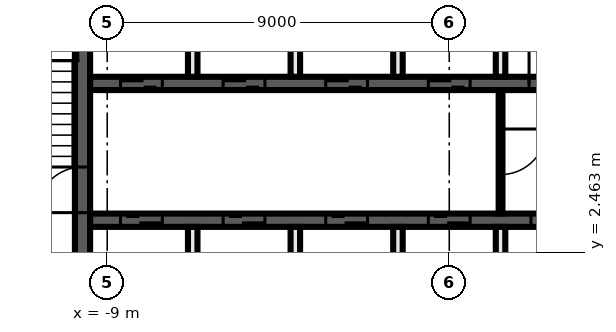
"""IFC4 building model, lengths in metres.
Left out: names, types, materials, properties, quantities, classifications, styles, units other than length and angle.
Written with IfcOpenShell. Run it as: python <this file> out.ifc"""

import sys

from ifc_helpers import new_model, si_unit, direction, frame, frame_2d, origin, place, context, subcontext, project, spatial, rectangle, extrude, element, fill, save


model = new_model("IFC4")
c1 = context("Model", 3, precision=1e-05, world=origin(), true_north=direction((0.0, 1.0)))
c2 = subcontext(c1, "Body", "Model", "MODEL_VIEW")
j1 = project(units=[si_unit("LENGTHUNIT", "METRE"), si_unit("PLANEANGLEUNIT", "RADIAN")], contexts=[c1])
p1 = place(None, origin())
s1 = spatial("IfcSite", under=j1, at=p1, CompositionType="ELEMENT")
p2 = place(p1, origin())
s2 = spatial("IfcBuilding", under=s1, at=p2, CompositionType="ELEMENT")
p3 = place(p2, frame((0.0, 0.0, 62.5)))
s3 = spatial("IfcBuildingStorey", under=s2, at=p3, CompositionType="ELEMENT", Elevation=62.5)
p4 = place(p3, frame((-9.65, 2.3, 0.0), z_axis=(0.0, 0.0, 1.0), x_axis=(0.0, 1.0, 0.0)))
e1 = element("IfcWall", 1, at=p4, inside=s3, PredefinedType="SHEAR", context=c2, shape_type="SweptSolid", body=[
    extrude(rectangle(XDim=7.5, YDim=0.4, at=frame_2d((3.75, 0.0))), origin(), (0.0, 0.0, 1.0), 3.3),
])
p5 = place(p4, frame((1.2, 0.0, 0.0)))
e2 = element("IfcOpeningElement", 2, at=p5, cuts=e1, PredefinedType="OPENING", context=c2, shape_type="SweptSolid", body=[
    extrude(rectangle(XDim=1.2, YDim=2.1, at=frame_2d((0.6, 1.05))), frame((0.0, 0.21, 0.0), z_axis=(0.0, -1.0, 0.0), x_axis=(1.0, 0.0, 0.0)), (0.0, 0.0, 1.0), 0.42),
])
p6 = place(p3, frame((-9.45, 6.9, 0.0), z_axis=(0.0, 0.0, 1.0), x_axis=(1.0, 0.0, 0.0)))
e3 = element("IfcWall", 3, at=p6, inside=s3, PredefinedType="SHEAR", context=c2, shape_type="SweptSolid", body=[
    extrude(rectangle(XDim=18.9, YDim=0.35, at=frame_2d((9.45, 0.0))), origin(), (0.0, 0.0, 1.0), 3.3),
])
p7 = place(p6, frame((0.8, 0.0, 0.0)))
e4 = element("IfcOpeningElement", 4, at=p7, cuts=e3, PredefinedType="OPENING", context=c2, shape_type="SweptSolid", body=[
    extrude(rectangle(XDim=1.1, YDim=2.1, at=frame_2d((0.55, 1.05))), frame((0.0, 0.185, 0.0), z_axis=(0.0, -1.0, 0.0), x_axis=(1.0, 0.0, 0.0)), (0.0, 0.0, 1.0), 0.37),
])
p8 = place(p6, frame((3.5, 0.0, 0.0)))
e5 = element("IfcOpeningElement", 5, at=p8, cuts=e3, PredefinedType="OPENING", context=c2, shape_type="SweptSolid", body=[
    extrude(rectangle(XDim=1.1, YDim=2.1, at=frame_2d((0.55, 1.05))), frame((0.0, 0.185, 0.0), z_axis=(0.0, -1.0, 0.0), x_axis=(1.0, 0.0, 0.0)), (0.0, 0.0, 1.0), 0.37),
])
p9 = place(p6, frame((6.2, 0.0, 0.0)))
e6 = element("IfcOpeningElement", 6, at=p9, cuts=e3, PredefinedType="OPENING", context=c2, shape_type="SweptSolid", body=[
    extrude(rectangle(XDim=1.1, YDim=2.1, at=frame_2d((0.55, 1.05))), frame((0.0, 0.185, 0.0), z_axis=(0.0, -1.0, 0.0), x_axis=(1.0, 0.0, 0.0)), (0.0, 0.0, 1.0), 0.37),
])
p10 = place(p6, frame((8.9, 0.0, 0.0)))
e7 = element("IfcOpeningElement", 7, at=p10, cuts=e3, PredefinedType="OPENING", context=c2, shape_type="SweptSolid", body=[
    extrude(rectangle(XDim=1.1, YDim=2.1, at=frame_2d((0.55, 1.05))), frame((0.0, 0.185, 0.0), z_axis=(0.0, -1.0, 0.0), x_axis=(1.0, 0.0, 0.0)), (0.0, 0.0, 1.0), 0.37),
])
p11 = place(p6, frame((11.55, 0.0, 0.0)))
e8 = element("IfcOpeningElement", 8, at=p11, cuts=e3, PredefinedType="OPENING", context=c2, shape_type="SweptSolid", body=[
    extrude(rectangle(XDim=1.2, YDim=2.1, at=frame_2d((0.6, 1.05))), frame((0.0, 0.185, 0.0), z_axis=(0.0, -1.0, 0.0), x_axis=(1.0, 0.0, 0.0)), (0.0, 0.0, 1.0), 0.37),
])
p12 = place(p6, frame((14.3, 0.0, 0.0)))
e9 = element("IfcOpeningElement", 9, at=p12, cuts=e3, PredefinedType="OPENING", context=c2, shape_type="SweptSolid", body=[
    extrude(rectangle(XDim=1.1, YDim=2.1, at=frame_2d((0.55, 1.05))), frame((0.0, 0.185, 0.0), z_axis=(0.0, -1.0, 0.0), x_axis=(1.0, 0.0, 0.0)), (0.0, 0.0, 1.0), 0.37),
])
p13 = place(p6, frame((17.0, 0.0, 0.0)))
e10 = element("IfcOpeningElement", 10, at=p13, cuts=e3, PredefinedType="OPENING", context=c2, shape_type="SweptSolid", body=[
    extrude(rectangle(XDim=1.1, YDim=2.1, at=frame_2d((0.55, 1.05))), frame((0.0, 0.185, 0.0), z_axis=(0.0, -1.0, 0.0), x_axis=(1.0, 0.0, 0.0)), (0.0, 0.0, 1.0), 0.37),
])
p14 = place(p3, frame((9.45, 3.3, 0.0), z_axis=(0.0, 0.0, 1.0), x_axis=(-1.0, 0.0, 0.0)))
e11 = element("IfcWall", 11, at=p14, inside=s3, PredefinedType="SHEAR", context=c2, shape_type="SweptSolid", body=[
    extrude(rectangle(XDim=18.9, YDim=0.35, at=frame_2d((9.45, 0.0))), origin(), (0.0, 0.0, 1.0), 3.3),
])
p15 = place(p14, frame((17.0, 0.0, 0.0)))
e12 = element("IfcOpeningElement", 12, at=p15, cuts=e11, PredefinedType="OPENING", context=c2, shape_type="SweptSolid", body=[
    extrude(rectangle(XDim=1.1, YDim=2.1, at=frame_2d((0.55, 1.05))), frame((0.0, 0.185, 0.0), z_axis=(0.0, -1.0, 0.0), x_axis=(1.0, 0.0, 0.0)), (0.0, 0.0, 1.0), 0.37),
])
p16 = place(p14, frame((14.3, 0.0, 0.0)))
e13 = element("IfcOpeningElement", 13, at=p16, cuts=e11, PredefinedType="OPENING", context=c2, shape_type="SweptSolid", body=[
    extrude(rectangle(XDim=1.1, YDim=2.1, at=frame_2d((0.55, 1.05))), frame((0.0, 0.185, 0.0), z_axis=(0.0, -1.0, 0.0), x_axis=(1.0, 0.0, 0.0)), (0.0, 0.0, 1.0), 0.37),
])
p17 = place(p14, frame((11.6, 0.0, 0.0)))
e14 = element("IfcOpeningElement", 14, at=p17, cuts=e11, PredefinedType="OPENING", context=c2, shape_type="SweptSolid", body=[
    extrude(rectangle(XDim=1.1, YDim=2.1, at=frame_2d((0.55, 1.05))), frame((0.0, 0.185, 0.0), z_axis=(0.0, -1.0, 0.0), x_axis=(1.0, 0.0, 0.0)), (0.0, 0.0, 1.0), 0.37),
])
p18 = place(p14, frame((8.9, 0.0, 0.0)))
e15 = element("IfcOpeningElement", 15, at=p18, cuts=e11, PredefinedType="OPENING", context=c2, shape_type="SweptSolid", body=[
    extrude(rectangle(XDim=1.1, YDim=2.1, at=frame_2d((0.55, 1.05))), frame((0.0, 0.185, 0.0), z_axis=(0.0, -1.0, 0.0), x_axis=(1.0, 0.0, 0.0)), (0.0, 0.0, 1.0), 0.37),
])
p19 = place(p14, frame((6.2, 0.0, 0.0)))
e16 = element("IfcOpeningElement", 16, at=p19, cuts=e11, PredefinedType="OPENING", context=c2, shape_type="SweptSolid", body=[
    extrude(rectangle(XDim=1.1, YDim=2.1, at=frame_2d((0.55, 1.05))), frame((0.0, 0.185, 0.0), z_axis=(0.0, -1.0, 0.0), x_axis=(1.0, 0.0, 0.0)), (0.0, 0.0, 1.0), 0.37),
])
p20 = place(p14, frame((3.5, 0.0, 0.0)))
e17 = element("IfcOpeningElement", 17, at=p20, cuts=e11, PredefinedType="OPENING", context=c2, shape_type="SweptSolid", body=[
    extrude(rectangle(XDim=1.1, YDim=2.1, at=frame_2d((0.55, 1.05))), frame((0.0, 0.185, 0.0), z_axis=(0.0, -1.0, 0.0), x_axis=(1.0, 0.0, 0.0)), (0.0, 0.0, 1.0), 0.37),
])
p21 = place(p14, frame((0.9, 0.0, 0.0)))
e18 = element("IfcOpeningElement", 18, at=p21, cuts=e11, PredefinedType="OPENING", context=c2, shape_type="SweptSolid", body=[
    extrude(rectangle(XDim=0.9, YDim=2.1, at=frame_2d((0.45, 1.05))), frame((0.0, 0.185, 0.0), z_axis=(0.0, -1.0, 0.0), x_axis=(1.0, 0.0, 0.0)), (0.0, 0.0, 1.0), 0.37),
])
p22 = place(p3, frame((1.35, 6.725, 0.0), z_axis=(0.0, 0.0, 1.0), x_axis=(0.0, -1.0, 0.0)))
e19 = element("IfcWall", 19, at=p22, inside=s3, PredefinedType="PARTITIONING", context=c2, shape_type="SweptSolid", body=[
    extrude(rectangle(XDim=3.25, YDim=0.1, at=frame_2d((1.625, 0.0))), origin(), (0.0, 0.0, 1.0), 3.3),
])
p23 = place(p22, frame((1.025, 0.0, 0.0)))
e20 = element("IfcOpeningElement", 20, at=p23, cuts=e19, PredefinedType="OPENING", context=c2, shape_type="SweptSolid", body=[
    extrude(rectangle(XDim=1.2, YDim=2.1, at=frame_2d((0.6, 1.05))), frame((0.0, 0.06, 0.0), z_axis=(0.0, -1.0, 0.0), x_axis=(1.0, 0.0, 0.0)), (0.0, 0.0, 1.0), 0.12),
])
for number, where, z_axis, x_axis in (
    (21, (1.35, 0.4, 0.0), (0.0, 0.0, 1.0), (0.0, 1.0, 0.0)),
    (22, (1.35, 7.075, 0.0), (0.0, 0.0, 1.0), (0.0, 1.0, 0.0)),
    (23, (-1.35, 0.4, 0.0), (0.0, 0.0, 1.0), (0.0, 1.0, 0.0)),
    (24, (-1.35, 7.075, 0.0), (0.0, 0.0, 1.0), (0.0, 1.0, 0.0)),
    (25, (-4.05, 0.4, 0.0), (0.0, 0.0, 1.0), (0.0, 1.0, 0.0)),
    (26, (-4.05, 7.075, 0.0), (0.0, 0.0, 1.0), (0.0, 1.0, 0.0)),
    (27, (-6.75, 0.4, 0.0), (0.0, 0.0, 1.0), (0.0, 1.0, 0.0)),
    (28, (-6.75, 7.075, 0.0), (0.0, 0.0, 1.0), (0.0, 1.0, 0.0)),
):
    element("IfcWall", number, at=place(p3, frame(where, z_axis=z_axis, x_axis=x_axis)), inside=s3, PredefinedType="SOLIDWALL", context=c2, shape_type="SweptSolid", body=[
        extrude(rectangle(XDim=2.725, YDim=0.25, at=frame_2d((1.363, 0.0))), origin(), (0.0, 0.0, 1.0), 3.3),
    ])
p24 = place(p7, origin())
e29 = element("IfcDoor", 29, at=p24, inside=s3, OperationType="DOUBLE_DOOR_SLIDING", PredefinedType="DOOR", context=c2, shape_type="SweptSolid", body=[
    extrude(rectangle(XDim=1.1, YDim=2.1, at=frame_2d((0.55, 1.05))), frame((0.0, 0.025, 0.0), z_axis=(0.0, -1.0, 0.0), x_axis=(1.0, 0.0, 0.0)), (0.0, 0.0, 1.0), 0.05),
])
fill(e4, e29)
p25 = place(p8, origin())
e30 = element("IfcDoor", 30, at=p25, inside=s3, OperationType="DOUBLE_DOOR_SLIDING", PredefinedType="DOOR", context=c2, shape_type="SweptSolid", body=[
    extrude(rectangle(XDim=1.1, YDim=2.1, at=frame_2d((0.55, 1.05))), frame((0.0, 0.025, 0.0), z_axis=(0.0, -1.0, 0.0), x_axis=(1.0, 0.0, 0.0)), (0.0, 0.0, 1.0), 0.05),
])
fill(e5, e30)
p26 = place(p9, origin())
e31 = element("IfcDoor", 31, at=p26, inside=s3, OperationType="DOUBLE_DOOR_SLIDING", PredefinedType="DOOR", context=c2, shape_type="SweptSolid", body=[
    extrude(rectangle(XDim=1.1, YDim=2.1, at=frame_2d((0.55, 1.05))), frame((0.0, 0.025, 0.0), z_axis=(0.0, -1.0, 0.0), x_axis=(1.0, 0.0, 0.0)), (0.0, 0.0, 1.0), 0.05),
])
fill(e6, e31)
p27 = place(p10, origin())
e32 = element("IfcDoor", 32, at=p27, inside=s3, OperationType="DOUBLE_DOOR_SLIDING", PredefinedType="DOOR", context=c2, shape_type="SweptSolid", body=[
    extrude(rectangle(XDim=1.1, YDim=2.1, at=frame_2d((0.55, 1.05))), frame((0.0, 0.025, 0.0), z_axis=(0.0, -1.0, 0.0), x_axis=(1.0, 0.0, 0.0)), (0.0, 0.0, 1.0), 0.05),
])
fill(e7, e32)
p28 = place(p11, origin())
e33 = element("IfcDoor", 33, at=p28, inside=s3, OperationType="SINGLE_SWING_LEFT", PredefinedType="DOOR", context=c2, shape_type="SweptSolid", body=[
    extrude(rectangle(XDim=1.2, YDim=2.1, at=frame_2d((0.6, 1.05))), frame((0.0, 0.025, 0.0), z_axis=(0.0, -1.0, 0.0), x_axis=(1.0, 0.0, 0.0)), (0.0, 0.0, 1.0), 0.05),
])
fill(e8, e33)
p29 = place(p15, origin())
e34 = element("IfcDoor", 34, at=p29, inside=s3, OperationType="DOUBLE_DOOR_SLIDING", PredefinedType="DOOR", context=c2, shape_type="SweptSolid", body=[
    extrude(rectangle(XDim=1.1, YDim=2.1, at=frame_2d((0.55, 1.05))), frame((0.0, 0.025, 0.0), z_axis=(0.0, -1.0, 0.0), x_axis=(1.0, 0.0, 0.0)), (0.0, 0.0, 1.0), 0.05),
])
fill(e12, e34)
p30 = place(p16, origin())
e35 = element("IfcDoor", 35, at=p30, inside=s3, OperationType="DOUBLE_DOOR_SLIDING", PredefinedType="DOOR", context=c2, shape_type="SweptSolid", body=[
    extrude(rectangle(XDim=1.1, YDim=2.1, at=frame_2d((0.55, 1.05))), frame((0.0, 0.025, 0.0), z_axis=(0.0, -1.0, 0.0), x_axis=(1.0, 0.0, 0.0)), (0.0, 0.0, 1.0), 0.05),
])
fill(e13, e35)
p31 = place(p17, origin())
e36 = element("IfcDoor", 36, at=p31, inside=s3, OperationType="DOUBLE_DOOR_SLIDING", PredefinedType="DOOR", context=c2, shape_type="SweptSolid", body=[
    extrude(rectangle(XDim=1.1, YDim=2.1, at=frame_2d((0.55, 1.05))), frame((0.0, 0.025, 0.0), z_axis=(0.0, -1.0, 0.0), x_axis=(1.0, 0.0, 0.0)), (0.0, 0.0, 1.0), 0.05),
])
fill(e14, e36)
p32 = place(p18, origin())
e37 = element("IfcDoor", 37, at=p32, inside=s3, OperationType="DOUBLE_DOOR_SLIDING", PredefinedType="DOOR", context=c2, shape_type="SweptSolid", body=[
    extrude(rectangle(XDim=1.1, YDim=2.1, at=frame_2d((0.55, 1.05))), frame((0.0, 0.025, 0.0), z_axis=(0.0, -1.0, 0.0), x_axis=(1.0, 0.0, 0.0)), (0.0, 0.0, 1.0), 0.05),
])
fill(e15, e37)
p33 = place(p19, origin())
e38 = element("IfcDoor", 38, at=p33, inside=s3, OperationType="DOUBLE_DOOR_SLIDING", PredefinedType="DOOR", context=c2, shape_type="SweptSolid", body=[
    extrude(rectangle(XDim=1.1, YDim=2.1, at=frame_2d((0.55, 1.05))), frame((0.0, 0.025, 0.0), z_axis=(0.0, -1.0, 0.0), x_axis=(1.0, 0.0, 0.0)), (0.0, 0.0, 1.0), 0.05),
])
fill(e16, e38)
p34 = place(p5, origin())
e39 = element("IfcDoor", 39, at=p34, inside=s3, OperationType="SINGLE_SWING_RIGHT", PredefinedType="DOOR", context=c2, shape_type="SweptSolid", body=[
    extrude(rectangle(XDim=1.2, YDim=2.1, at=frame_2d((0.6, 1.05))), frame((0.0, 0.025, 0.0), z_axis=(0.0, -1.0, 0.0), x_axis=(1.0, 0.0, 0.0)), (0.0, 0.0, 1.0), 0.05),
])
fill(e2, e39)
p35 = place(p23, origin())
e40 = element("IfcDoor", 40, at=p35, inside=s3, OperationType="SINGLE_SWING_LEFT", PredefinedType="DOOR", context=c2, shape_type="SweptSolid", body=[
    extrude(rectangle(XDim=1.2, YDim=2.1, at=frame_2d((0.6, 1.05))), frame((0.0, 0.025, 0.0), z_axis=(0.0, -1.0, 0.0), x_axis=(1.0, 0.0, 0.0)), (0.0, 0.0, 1.0), 0.05),
])
fill(e20, e40)
save(model, sys.argv[1])
